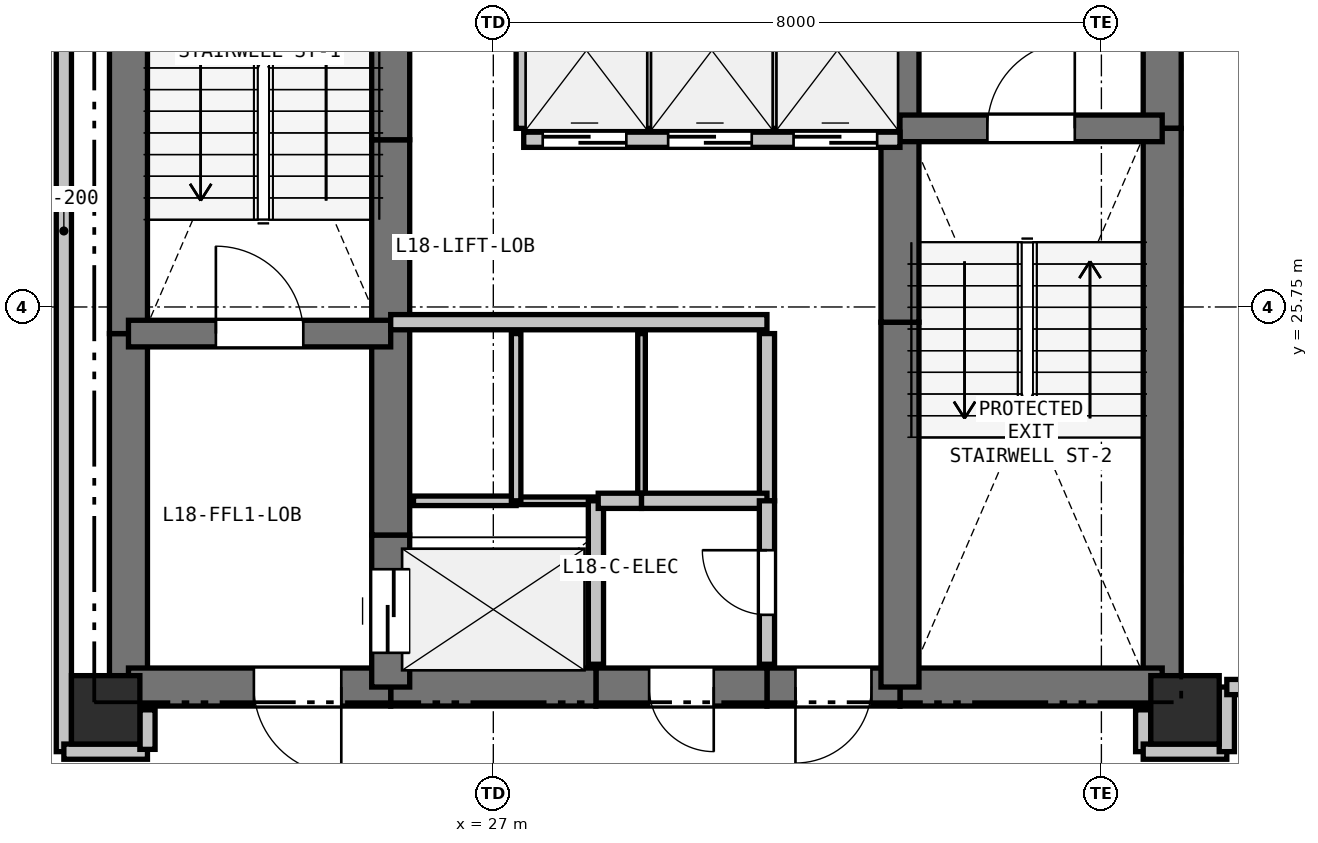
"""IFC4 building model, lengths in metres.
Left out: names, types, materials, properties, quantities, classifications, styles, units other than length and angle.
Written with IfcOpenShell. Run it as: python <this file> out.ifc"""

import sys

from ifc_helpers import new_model, si_unit, direction, frame, frame_2d, origin, origin_2d, place, context, subcontext, project, spatial, rectangle, extrude, element, fill, save


model = new_model("IFC4")
c1 = context("Model", 3, precision=1e-05, world=origin(), true_north=direction((0.0, 1.0)))
c2 = subcontext(c1, "Body", "Model", "MODEL_VIEW")
j1 = project(units=[si_unit("LENGTHUNIT", "METRE"), si_unit("PLANEANGLEUNIT", "RADIAN")], contexts=[c1])
p1 = place(None, origin())
s1 = spatial("IfcSite", under=j1, at=p1, CompositionType="ELEMENT")
p2 = place(p1, origin())
s2 = spatial("IfcBuilding", under=s1, at=p2, CompositionType="ELEMENT")
p3 = place(p2, frame((0.0, 0.0, 66.9)))
s3 = spatial("IfcBuildingStorey", under=s2, at=p3, CompositionType="ELEMENT", Elevation=66.9)
for number, where, z_axis, x_axis in (
    (1, (21.9, 20.45, 0.0), (0.0, 0.0, 1.0), (1.0, 0.0, 0.0)),
    (2, (36.1, 20.45, 0.0), (0.0, 0.0, 1.0), (1.0, 0.0, 0.0)),
):
    element("IfcColumn", number, at=place(p3, frame(where, z_axis=z_axis, x_axis=x_axis)), inside=s3, PredefinedType="COLUMN", context=c2, shape_type="SweptSolid", body=[
        extrude(rectangle(XDim=0.9, YDim=0.9, at=origin_2d()), origin(), (0.0, 0.0, 1.0), 6.6),
    ])
for number, where, z_axis, x_axis in (
    (3, (7.087, 28.11, 0.0), (0.0, 0.0, 1.0), (0.866, 0.5, 0.0)),
    (4, (38.779, 7.092, 0.0), (0.0, 0.0, 1.0), (-0.866, 0.5, 0.0)),
):
    element("IfcWall", number, at=place(p3, frame(where, z_axis=z_axis, x_axis=x_axis)), inside=s3, PredefinedType="SOLIDWALL", context=c2, shape_type="SweptSolid", body=[
        extrude(rectangle(XDim=36.595, YDim=0.25, at=frame_2d((18.297, 0.0))), origin(), (0.0, 0.0, 1.0), 5.723),
    ])
p4 = place(p3, frame((22.2, 20.75, 0.0), z_axis=(0.0, 0.0, 1.0), x_axis=(0.0, 1.0, 0.0)))
e5 = element("IfcWall", 5, at=p4, inside=s3, PredefinedType="SHEAR", context=c2, shape_type="SweptSolid", body=[
    extrude(rectangle(XDim=4.65, YDim=0.5, at=frame_2d((2.325, 0.0))), origin(), (0.0, 0.0, 1.0), 6.35),
])
p5 = place(p3, frame((22.2, 25.4, 0.0), z_axis=(0.0, 0.0, 1.0), x_axis=(0.0, 1.0, 0.0)))
e6 = element("IfcWall", 6, at=p5, inside=s3, PredefinedType="SHEAR", context=c2, shape_type="SweptSolid", body=[
    extrude(rectangle(XDim=7.35, YDim=0.5, at=frame_2d((3.675, 0.0))), origin(), (0.0, 0.0, 1.0), 6.35),
])
p6 = place(p3, frame((35.8, 32.75, 0.0), z_axis=(0.0, 0.0, 1.0), x_axis=(0.0, -1.0, 0.0)))
e7 = element("IfcWall", 7, at=p6, inside=s3, PredefinedType="SHEAR", context=c2, shape_type="SweptSolid", body=[
    extrude(rectangle(XDim=4.65, YDim=0.5, at=frame_2d((2.325, 0.0))), origin(), (0.0, 0.0, 1.0), 6.35),
])
p7 = place(p3, frame((35.8, 28.1, 0.0), z_axis=(0.0, 0.0, 1.0), x_axis=(0.0, -1.0, 0.0)))
e8 = element("IfcWall", 8, at=p7, inside=s3, PredefinedType="SHEAR", context=c2, shape_type="SweptSolid", body=[
    extrude(rectangle(XDim=7.35, YDim=0.5, at=frame_2d((3.675, 0.0))), origin(), (0.0, 0.0, 1.0), 6.35),
])
p8 = place(p3, frame((35.8, 20.75, 0.0), z_axis=(0.0, 0.0, 1.0), x_axis=(-1.0, 0.0, 0.0)))
e9 = element("IfcWall", 9, at=p8, inside=s3, PredefinedType="SHEAR", context=c2, shape_type="SweptSolid", body=[
    extrude(rectangle(XDim=3.45, YDim=0.5, at=frame_2d((1.725, 0.0))), origin(), (0.0, 0.0, 1.0), 6.35),
])
p9 = place(p3, frame((32.35, 20.75, 0.0), z_axis=(0.0, 0.0, 1.0), x_axis=(-1.0, 0.0, 0.0)))
e10 = element("IfcWall", 10, at=p9, inside=s3, PredefinedType="SHEAR", context=c2, shape_type="SweptSolid", body=[
    extrude(rectangle(XDim=1.75, YDim=0.5, at=frame_2d((0.875, 0.0))), origin(), (0.0, 0.0, 1.0), 6.35),
])
p10 = place(p9, frame((0.375, 0.0, 0.0)))
e11 = element("IfcOpeningElement", 11, at=p10, cuts=e10, PredefinedType="OPENING", context=c2, shape_type="SweptSolid", body=[
    extrude(rectangle(XDim=1.0, YDim=2.15, at=frame_2d((0.5, 1.075))), frame((0.0, 0.26, 0.0), z_axis=(0.0, -1.0, 0.0), x_axis=(1.0, 0.0, 0.0)), (0.0, 0.0, 1.0), 0.52),
])
p11 = place(p3, frame((30.6, 20.75, 0.0), z_axis=(0.0, 0.0, 1.0), x_axis=(-1.0, 0.0, 0.0)))
e12 = element("IfcWall", 12, at=p11, inside=s3, PredefinedType="SHEAR", context=c2, shape_type="SweptSolid", body=[
    extrude(rectangle(XDim=2.25, YDim=0.5, at=frame_2d((1.125, 0.0))), origin(), (0.0, 0.0, 1.0), 6.35),
])
p12 = place(p11, frame((0.7, 0.0, 0.0)))
e13 = element("IfcOpeningElement", 13, at=p12, cuts=e12, PredefinedType="OPENING", context=c2, shape_type="SweptSolid", body=[
    extrude(rectangle(XDim=0.85, YDim=2.1, at=frame_2d((0.425, 1.05))), frame((0.0, 0.26, 0.0), z_axis=(0.0, -1.0, 0.0), x_axis=(1.0, 0.0, 0.0)), (0.0, 0.0, 1.0), 0.52),
])
p13 = place(p3, frame((28.35, 20.75, 0.0), z_axis=(0.0, 0.0, 1.0), x_axis=(-1.0, 0.0, 0.0)))
e14 = element("IfcWall", 14, at=p13, inside=s3, PredefinedType="SHEAR", context=c2, shape_type="SweptSolid", body=[
    extrude(rectangle(XDim=2.7, YDim=0.5, at=frame_2d((1.35, 0.0))), origin(), (0.0, 0.0, 1.0), 6.35),
])
p14 = place(p3, frame((25.65, 20.75, 0.0), z_axis=(0.0, 0.0, 1.0), x_axis=(-1.0, 0.0, 0.0)))
e15 = element("IfcWall", 15, at=p14, inside=s3, PredefinedType="SHEAR", context=c2, shape_type="SweptSolid", body=[
    extrude(rectangle(XDim=3.45, YDim=0.5, at=frame_2d((1.725, 0.0))), origin(), (0.0, 0.0, 1.0), 6.35),
])
p15 = place(p14, frame((0.65, 0.0, 0.0)))
e16 = element("IfcOpeningElement", 16, at=p15, cuts=e15, PredefinedType="OPENING", context=c2, shape_type="SweptSolid", body=[
    extrude(rectangle(XDim=1.15, YDim=2.15, at=frame_2d((0.575, 1.075))), frame((0.0, 0.26, 0.0), z_axis=(0.0, -1.0, 0.0), x_axis=(1.0, 0.0, 0.0)), (0.0, 0.0, 1.0), 0.52),
])
p16 = place(p3, frame((25.65, 20.75, 0.0), z_axis=(0.0, 0.0, 1.0), x_axis=(0.0, 1.0, 0.0)))
e17 = element("IfcWall", 17, at=p16, inside=s3, PredefinedType="SHEAR", context=c2, shape_type="SweptSolid", body=[
    extrude(rectangle(XDim=2.0, YDim=0.5, at=frame_2d((1.0, 0.0))), origin(), (0.0, 0.0, 1.0), 6.35),
])
p17 = place(p16, frame((0.45, 0.0, 0.0)))
e18 = element("IfcOpeningElement", 18, at=p17, cuts=e17, PredefinedType="OPENING", context=c2, shape_type="SweptSolid", body=[
    extrude(rectangle(XDim=1.1, YDim=2.15, at=frame_2d((0.55, 1.075))), frame((0.0, 0.26, 0.0), z_axis=(0.0, -1.0, 0.0), x_axis=(1.0, 0.0, 0.0)), (0.0, 0.0, 1.0), 0.52),
])
p18 = place(p3, frame((25.65, 22.75, 0.0), z_axis=(0.0, 0.0, 1.0), x_axis=(0.0, 1.0, 0.0)))
e19 = element("IfcWall", 19, at=p18, inside=s3, PredefinedType="SHEAR", context=c2, shape_type="SweptSolid", body=[
    extrude(rectangle(XDim=2.8, YDim=0.5, at=frame_2d((1.4, 0.0))), origin(), (0.0, 0.0, 1.0), 6.35),
])
p19 = place(p3, frame((25.65, 25.55, 0.0), z_axis=(0.0, 0.0, 1.0), x_axis=(0.0, 1.0, 0.0)))
e20 = element("IfcWall", 20, at=p19, inside=s3, PredefinedType="SHEAR", context=c2, shape_type="SweptSolid", body=[
    extrude(rectangle(XDim=2.4, YDim=0.5, at=frame_2d((1.2, 0.0))), origin(), (0.0, 0.0, 1.0), 6.35),
])
for number, where, z_axis, x_axis in (
    (21, (25.65, 27.95, 0.0), (0.0, 0.0, 1.0), (0.0, 1.0, 0.0)),
    (22, (32.35, 20.75, 0.0), (0.0, 0.0, 1.0), (0.0, 1.0, 0.0)),
):
    element("IfcWall", number, at=place(p3, frame(where, z_axis=z_axis, x_axis=x_axis)), inside=s3, PredefinedType="SHEAR", context=c2, shape_type="SweptSolid", body=[
        extrude(rectangle(XDim=4.8, YDim=0.5, at=frame_2d((2.4, 0.0))), origin(), (0.0, 0.0, 1.0), 6.35),
    ])
p20 = place(p3, frame((32.35, 25.55, 0.0), z_axis=(0.0, 0.0, 1.0), x_axis=(0.0, 1.0, 0.0)))
e23 = element("IfcWall", 23, at=p20, inside=s3, PredefinedType="SHEAR", context=c2, shape_type="SweptSolid", body=[
    extrude(rectangle(XDim=2.4, YDim=0.5, at=frame_2d((1.2, 0.0))), origin(), (0.0, 0.0, 1.0), 6.35),
])
p21 = place(p3, frame((32.35, 27.95, 0.0), z_axis=(0.0, 0.0, 1.0), x_axis=(0.0, 1.0, 0.0)))
e24 = element("IfcWall", 24, at=p21, inside=s3, PredefinedType="SHEAR", context=c2, shape_type="SweptSolid", body=[
    extrude(rectangle(XDim=2.8, YDim=0.5, at=frame_2d((1.4, 0.0))), origin(), (0.0, 0.0, 1.0), 6.35),
])
p22 = place(p3, frame((22.2, 25.4, 0.0), z_axis=(0.0, 0.0, 1.0), x_axis=(1.0, 0.0, 0.0)))
e25 = element("IfcWall", 25, at=p22, inside=s3, PredefinedType="SHEAR", context=c2, shape_type="SweptSolid", body=[
    extrude(rectangle(XDim=3.45, YDim=0.35, at=frame_2d((1.725, 0.0))), origin(), (0.0, 0.0, 1.0), 6.35),
])
p23 = place(p22, frame((1.15, 0.0, 0.0)))
e26 = element("IfcOpeningElement", 26, at=p23, cuts=e25, PredefinedType="OPENING", context=c2, shape_type="SweptSolid", body=[
    extrude(rectangle(XDim=1.15, YDim=2.15, at=frame_2d((0.575, 1.075))), frame((0.0, 0.185, 0.0), z_axis=(0.0, -1.0, 0.0), x_axis=(1.0, 0.0, 0.0)), (0.0, 0.0, 1.0), 0.37),
])
p24 = place(p3, frame((32.35, 28.1, 0.0), z_axis=(0.0, 0.0, 1.0), x_axis=(1.0, 0.0, 0.0)))
e27 = element("IfcWall", 27, at=p24, inside=s3, PredefinedType="SHEAR", context=c2, shape_type="SweptSolid", body=[
    extrude(rectangle(XDim=3.45, YDim=0.35, at=frame_2d((1.725, 0.0))), origin(), (0.0, 0.0, 1.0), 6.35),
])
p25 = place(p24, frame((1.15, 0.0, 0.0)))
e28 = element("IfcOpeningElement", 28, at=p25, cuts=e27, PredefinedType="OPENING", context=c2, shape_type="SweptSolid", body=[
    extrude(rectangle(XDim=1.15, YDim=2.15, at=frame_2d((0.575, 1.075))), frame((0.0, 0.185, 0.0), z_axis=(0.0, -1.0, 0.0), x_axis=(1.0, 0.0, 0.0)), (0.0, 0.0, 1.0), 0.37),
])
p26 = place(p3, frame((25.65, 25.55, 0.0), z_axis=(0.0, 0.0, 1.0), x_axis=(1.0, 0.0, 0.0)))
e29 = element("IfcWall", 29, at=p26, inside=s3, PredefinedType="PARTITIONING", context=c2, shape_type="SweptSolid", body=[
    extrude(rectangle(XDim=4.95, YDim=0.2, at=frame_2d((2.475, 0.0))), origin(), (0.0, 0.0, 1.0), 6.35),
])
p27 = place(p3, frame((27.4, 27.95, 0.0), z_axis=(0.0, 0.0, 1.0), x_axis=(1.0, 0.0, 0.0)))
e30 = element("IfcWall", 30, at=p27, inside=s3, PredefinedType="PARTITIONING", context=c2, shape_type="SweptSolid", body=[
    extrude(rectangle(XDim=4.95, YDim=0.2, at=frame_2d((2.475, 0.0))), origin(), (0.0, 0.0, 1.0), 6.35),
])
p28 = place(p27, frame((0.25, 0.0, 0.0)))
e31 = element("IfcOpeningElement", 31, at=p28, cuts=e30, PredefinedType="OPENING", context=c2, shape_type="SweptSolid", body=[
    extrude(rectangle(XDim=1.1, YDim=2.15, at=frame_2d((0.55, 1.075))), frame((0.0, 0.11, 0.0), z_axis=(0.0, -1.0, 0.0), x_axis=(1.0, 0.0, 0.0)), (0.0, 0.0, 1.0), 0.22),
])
p29 = place(p27, frame((1.9, 0.0, 0.0)))
e32 = element("IfcOpeningElement", 32, at=p29, cuts=e30, PredefinedType="OPENING", context=c2, shape_type="SweptSolid", body=[
    extrude(rectangle(XDim=1.1, YDim=2.15, at=frame_2d((0.55, 1.075))), frame((0.0, 0.11, 0.0), z_axis=(0.0, -1.0, 0.0), x_axis=(1.0, 0.0, 0.0)), (0.0, 0.0, 1.0), 0.22),
])
p30 = place(p27, frame((3.55, 0.0, 0.0)))
e33 = element("IfcOpeningElement", 33, at=p30, cuts=e30, PredefinedType="OPENING", context=c2, shape_type="SweptSolid", body=[
    extrude(rectangle(XDim=1.1, YDim=2.15, at=frame_2d((0.55, 1.075))), frame((0.0, 0.11, 0.0), z_axis=(0.0, -1.0, 0.0), x_axis=(1.0, 0.0, 0.0)), (0.0, 0.0, 1.0), 0.22),
])
p31 = place(p3, frame((25.95, 23.2, 0.0), z_axis=(0.0, 0.0, 1.0), x_axis=(1.0, 0.0, 0.0)))
e34 = element("IfcWall", 34, at=p31, inside=s3, PredefinedType="PARTITIONING", context=c2, shape_type="SweptSolid", body=[
    extrude(rectangle(XDim=1.35, YDim=0.125, at=frame_2d((0.675, 0.0))), origin(), (0.0, 0.0, 1.0), 6.35),
])
p32 = place(p3, frame((27.3, 23.2, 0.0), z_axis=(0.0, 0.0, 1.0), x_axis=(1.0, 0.0, 0.0)))
e35 = element("IfcWall", 35, at=p32, inside=s3, PredefinedType="PARTITIONING", context=c2, shape_type="SweptSolid", body=[
    extrude(rectangle(XDim=1.05, YDim=0.1, at=frame_2d((0.525, 0.0))), origin(), (0.0, 0.0, 1.0), 6.35),
])
p33 = place(p3, frame((28.35, 23.2, 0.0), z_axis=(0.0, 0.0, 1.0), x_axis=(0.0, -1.0, 0.0)))
e36 = element("IfcWall", 36, at=p33, inside=s3, PredefinedType="PARTITIONING", context=c2, shape_type="SweptSolid", body=[
    extrude(rectangle(XDim=2.15, YDim=0.2, at=frame_2d((1.075, 0.0))), origin(), (0.0, 0.0, 1.0), 6.35),
])
p34 = place(p3, frame((27.3, 25.4, 0.0), z_axis=(0.0, 0.0, 1.0), x_axis=(0.0, -1.0, 0.0)))
e37 = element("IfcWall", 37, at=p34, inside=s3, PredefinedType="PARTITIONING", context=c2, shape_type="SweptSolid", body=[
    extrude(rectangle(XDim=2.2, YDim=0.125, at=frame_2d((1.1, 0.0))), origin(), (0.0, 0.0, 1.0), 6.35),
])
p35 = place(p3, frame((28.95, 25.4, 0.0), z_axis=(0.0, 0.0, 1.0), x_axis=(0.0, -1.0, 0.0)))
e38 = element("IfcWall", 38, at=p35, inside=s3, PredefinedType="PARTITIONING", context=c2, shape_type="SweptSolid", body=[
    extrude(rectangle(XDim=2.2, YDim=0.1, at=frame_2d((1.1, 0.0))), origin(), (0.0, 0.0, 1.0), 6.35),
])
p36 = place(p3, frame((28.95, 23.2, 0.0), z_axis=(0.0, 0.0, 1.0), x_axis=(-1.0, 0.0, 0.0)))
e39 = element("IfcWall", 39, at=p36, inside=s3, PredefinedType="PARTITIONING", context=c2, shape_type="SweptSolid", body=[
    extrude(rectangle(XDim=0.57, YDim=0.2, at=frame_2d((0.285, 0.0))), origin(), (0.0, 0.0, 1.0), 6.35),
])
p37 = place(p3, frame((30.6, 25.4, 0.0), z_axis=(0.0, 0.0, 1.0), x_axis=(0.0, -1.0, 0.0)))
e40 = element("IfcWall", 40, at=p37, inside=s3, PredefinedType="PARTITIONING", context=c2, shape_type="SweptSolid", body=[
    extrude(rectangle(XDim=2.2, YDim=0.2, at=frame_2d((1.1, 0.0))), origin(), (0.0, 0.0, 1.0), 6.35),
])
p38 = place(p3, frame((30.6, 23.2, 0.0), z_axis=(0.0, 0.0, 1.0), x_axis=(-1.0, 0.0, 0.0)))
e41 = element("IfcWall", 41, at=p38, inside=s3, PredefinedType="PARTITIONING", context=c2, shape_type="SweptSolid", body=[
    extrude(rectangle(XDim=1.65, YDim=0.2, at=frame_2d((0.825, 0.0))), origin(), (0.0, 0.0, 1.0), 6.35),
])
p39 = place(p3, frame((29.05, 30.3, 0.0), z_axis=(0.0, 0.0, 1.0), x_axis=(0.0, -1.0, 0.0)))
e42 = element("IfcWall", 42, at=p39, inside=s3, PredefinedType="PARTITIONING", context=c2, shape_type="SweptSolid", body=[
    extrude(rectangle(XDim=2.2, YDim=0.125, at=frame_2d((1.1, 0.0))), origin(), (0.0, 0.0, 1.0), 6.35),
])
p40 = place(p3, frame((27.4, 28.1, 0.0), z_axis=(0.0, 0.0, 1.0), x_axis=(0.0, 1.0, 0.0)))
e43 = element("IfcWall", 43, at=p40, inside=s3, PredefinedType="PARTITIONING", context=c2, shape_type="SweptSolid", body=[
    extrude(rectangle(XDim=2.2, YDim=0.2, at=frame_2d((1.1, 0.0))), origin(), (0.0, 0.0, 1.0), 6.35),
])
p41 = place(p3, frame((30.7, 30.3, 0.0), z_axis=(0.0, 0.0, 1.0), x_axis=(0.0, -1.0, 0.0)))
e44 = element("IfcWall", 44, at=p41, inside=s3, PredefinedType="PARTITIONING", context=c2, shape_type="SweptSolid", body=[
    extrude(rectangle(XDim=2.2, YDim=0.1, at=frame_2d((1.1, 0.0))), origin(), (0.0, 0.0, 1.0), 6.35),
])
p42 = place(p3, frame((30.6, 21.05, 0.0), z_axis=(0.0, 0.0, 1.0), x_axis=(0.0, 1.0, 0.0)))
e45 = element("IfcWall", 45, at=p42, inside=s3, PredefinedType="PARTITIONING", context=c2, shape_type="SweptSolid", body=[
    extrude(rectangle(XDim=2.15, YDim=0.2, at=frame_2d((1.075, 0.0))), origin(), (0.0, 0.0, 1.0), 6.35),
])
p43 = place(p42, frame((0.65, 0.0, 0.0)))
e46 = element("IfcOpeningElement", 46, at=p43, cuts=e45, PredefinedType="OPENING", context=c2, shape_type="SweptSolid", body=[
    extrude(rectangle(XDim=0.85, YDim=2.1, at=frame_2d((0.425, 1.05))), frame((0.0, 0.11, 0.0), z_axis=(0.0, -1.0, 0.0), x_axis=(1.0, 0.0, 0.0)), (0.0, 0.0, 1.0), 0.22),
])
p44 = place(p3, frame((21.35, 33.6, 0.0), z_axis=(0.0, 0.0, 1.0), x_axis=(0.0, -1.0, 0.0)))
e47 = element("IfcWall", 47, at=p44, inside=s3, PredefinedType="PARTITIONING", context=c2, shape_type="SweptSolid", body=[
    extrude(rectangle(XDim=13.7, YDim=0.2, at=frame_2d((6.85, 0.0))), origin(), (0.0, 0.0, 1.0), 5.723),
])
p45 = place(p3, frame((21.35, 19.9, 0.0), z_axis=(0.0, 0.0, 1.0), x_axis=(1.0, 0.0, 0.0)))
e48 = element("IfcWall", 48, at=p45, inside=s3, PredefinedType="PARTITIONING", context=c2, shape_type="SweptSolid", body=[
    extrude(rectangle(XDim=1.1, YDim=0.2, at=frame_2d((0.55, 0.0))), origin(), (0.0, 0.0, 1.0), 5.723),
])
p46 = place(p3, frame((22.45, 19.93, 0.0), z_axis=(0.0, 0.0, 1.0), x_axis=(0.0, 1.0, 0.0)))
e49 = element("IfcWall", 49, at=p46, inside=s3, PredefinedType="PARTITIONING", context=c2, shape_type="SweptSolid", body=[
    extrude(rectangle(XDim=0.52, YDim=0.2, at=frame_2d((0.26, 0.0))), origin(), (0.0, 0.0, 1.0), 5.723),
])
p47 = place(p3, frame((35.55, 20.45, 0.0), z_axis=(0.0, 0.0, 1.0), x_axis=(0.0, -1.0, 0.0)))
e50 = element("IfcWall", 50, at=p47, inside=s3, PredefinedType="PARTITIONING", context=c2, shape_type="SweptSolid", body=[
    extrude(rectangle(XDim=0.55, YDim=0.2, at=frame_2d((0.275, 0.0))), origin(), (0.0, 0.0, 1.0), 5.798),
])
p48 = place(p3, frame((35.55, 19.9, 0.0), z_axis=(0.0, 0.0, 1.0), x_axis=(1.0, 0.0, 0.0)))
e51 = element("IfcWall", 51, at=p48, inside=s3, PredefinedType="PARTITIONING", context=c2, shape_type="SweptSolid", body=[
    extrude(rectangle(XDim=1.1, YDim=0.2, at=frame_2d((0.55, 0.0))), origin(), (0.0, 0.0, 1.0), 5.723),
])
for number, where, z_axis, x_axis in (
    (52, (36.65, 19.9, 0.0), (0.0, 0.0, 1.0), (0.0, 1.0, 0.0)),
    (53, (36.65, 20.75, 0.0), (0.0, 0.0, 1.0), (1.0, 0.0, 0.0)),
):
    element("IfcWall", number, at=place(p3, frame(where, z_axis=z_axis, x_axis=x_axis)), inside=s3, PredefinedType="PARTITIONING", context=c2, shape_type="SweptSolid", body=[
        extrude(rectangle(XDim=0.85, YDim=0.2, at=frame_2d((0.425, 0.0))), origin(), (0.0, 0.0, 1.0), 6.35),
    ])
p49 = place(p28, origin())
e54 = element("IfcDoor", 54, at=p49, inside=s3, OperationType="SLIDING_TO_LEFT", PredefinedType="DOOR", context=c2, shape_type="SweptSolid", body=[
    extrude(rectangle(XDim=1.1, YDim=2.15, at=frame_2d((0.55, 1.075))), frame((0.0, 0.025, 0.0), z_axis=(0.0, -1.0, 0.0), x_axis=(1.0, 0.0, 0.0)), (0.0, 0.0, 1.0), 0.05),
])
fill(e31, e54)
p50 = place(p29, origin())
e55 = element("IfcDoor", 55, at=p50, inside=s3, OperationType="SLIDING_TO_LEFT", PredefinedType="DOOR", context=c2, shape_type="SweptSolid", body=[
    extrude(rectangle(XDim=1.1, YDim=2.15, at=frame_2d((0.55, 1.075))), frame((0.0, 0.025, 0.0), z_axis=(0.0, -1.0, 0.0), x_axis=(1.0, 0.0, 0.0)), (0.0, 0.0, 1.0), 0.05),
])
fill(e32, e55)
p51 = place(p30, origin())
e56 = element("IfcDoor", 56, at=p51, inside=s3, OperationType="SLIDING_TO_LEFT", PredefinedType="DOOR", context=c2, shape_type="SweptSolid", body=[
    extrude(rectangle(XDim=1.1, YDim=2.15, at=frame_2d((0.55, 1.075))), frame((0.0, 0.025, 0.0), z_axis=(0.0, -1.0, 0.0), x_axis=(1.0, 0.0, 0.0)), (0.0, 0.0, 1.0), 0.05),
])
fill(e33, e56)
p52 = place(p10, origin())
e57 = element("IfcDoor", 57, at=p52, inside=s3, OperationType="SINGLE_SWING_RIGHT", PredefinedType="DOOR", context=c2, shape_type="SweptSolid", body=[
    extrude(rectangle(XDim=1.0, YDim=2.15, at=frame_2d((0.5, 1.075))), frame((0.0, 0.025, 0.0), z_axis=(0.0, -1.0, 0.0), x_axis=(1.0, 0.0, 0.0)), (0.0, 0.0, 1.0), 0.05),
])
fill(e11, e57)
p53 = place(p17, origin())
e58 = element("IfcDoor", 58, at=p53, inside=s3, OperationType="SLIDING_TO_LEFT", PredefinedType="DOOR", context=c2, shape_type="SweptSolid", body=[
    extrude(rectangle(XDim=1.1, YDim=2.15, at=frame_2d((0.55, 1.075))), frame((0.0, 0.025, 0.0), z_axis=(0.0, -1.0, 0.0), x_axis=(1.0, 0.0, 0.0)), (0.0, 0.0, 1.0), 0.05),
])
fill(e18, e58)
p54 = place(p23, origin())
e59 = element("IfcDoor", 59, at=p54, inside=s3, OperationType="SINGLE_SWING_LEFT", PredefinedType="DOOR", context=c2, shape_type="SweptSolid", body=[
    extrude(rectangle(XDim=1.15, YDim=2.15, at=frame_2d((0.575, 1.075))), frame((0.0, 0.025, 0.0), z_axis=(0.0, -1.0, 0.0), x_axis=(1.0, 0.0, 0.0)), (0.0, 0.0, 1.0), 0.05),
])
fill(e26, e59)
p55 = place(p25, origin())
e60 = element("IfcDoor", 60, at=p55, inside=s3, OperationType="SINGLE_SWING_RIGHT", PredefinedType="DOOR", context=c2, shape_type="SweptSolid", body=[
    extrude(rectangle(XDim=1.15, YDim=2.15, at=frame_2d((0.575, 1.075))), frame((0.0, 0.025, 0.0), z_axis=(0.0, -1.0, 0.0), x_axis=(1.0, 0.0, 0.0)), (0.0, 0.0, 1.0), 0.05),
])
fill(e28, e60)
p56 = place(p15, origin())
e61 = element("IfcDoor", 61, at=p56, inside=s3, OperationType="SINGLE_SWING_LEFT", PredefinedType="DOOR", context=c2, shape_type="SweptSolid", body=[
    extrude(rectangle(XDim=1.15, YDim=2.15, at=frame_2d((0.575, 1.075))), frame((0.0, 0.025, 0.0), z_axis=(0.0, -1.0, 0.0), x_axis=(1.0, 0.0, 0.0)), (0.0, 0.0, 1.0), 0.05),
])
fill(e16, e61)
p57 = place(p43, origin())
e62 = element("IfcDoor", 62, at=p57, inside=s3, OperationType="SINGLE_SWING_RIGHT", PredefinedType="DOOR", context=c2, shape_type="SweptSolid", body=[
    extrude(rectangle(XDim=0.85, YDim=2.1, at=frame_2d((0.425, 1.05))), frame((0.0, 0.025, 0.0), z_axis=(0.0, -1.0, 0.0), x_axis=(1.0, 0.0, 0.0)), (0.0, 0.0, 1.0), 0.05),
])
fill(e46, e62)
p58 = place(p12, origin())
e63 = element("IfcDoor", 63, at=p58, inside=s3, OperationType="SINGLE_SWING_LEFT", PredefinedType="DOOR", context=c2, shape_type="SweptSolid", body=[
    extrude(rectangle(XDim=0.85, YDim=2.1, at=frame_2d((0.425, 1.05))), frame((0.0, 0.025, 0.0), z_axis=(0.0, -1.0, 0.0), x_axis=(1.0, 0.0, 0.0)), (0.0, 0.0, 1.0), 0.05),
])
fill(e13, e63)
save(model, sys.argv[1])
